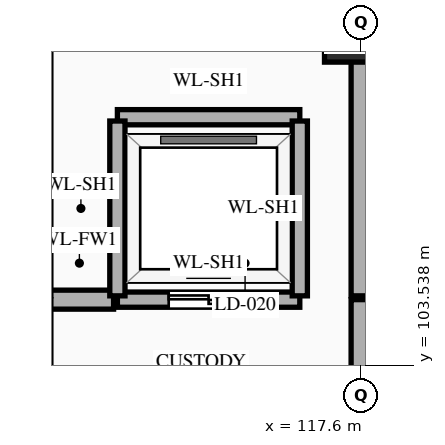
"""IFC4 building model, lengths in metres.
Left out: names, types, materials, properties, quantities, classifications, styles, units other than length and angle.
Written with IfcOpenShell. Run it as: python <this file> out.ifc"""

import sys

from ifc_helpers import new_model, si_unit, direction, frame, frame_2d, origin, origin_2d, place, context, subcontext, project, spatial, rectangle, extrude, element, fill, save


model = new_model("IFC4")
c1 = context("Model", 3, precision=1e-05, world=origin(), true_north=direction((0.0, 1.0)))
c2 = subcontext(c1, "Body", "Model", "MODEL_VIEW")
j1 = project(units=[si_unit("LENGTHUNIT", "METRE"), si_unit("PLANEANGLEUNIT", "RADIAN")], contexts=[c1])
p1 = place(None, origin())
s1 = spatial("IfcSite", under=j1, at=p1, CompositionType="ELEMENT")
p2 = place(p1, origin())
s2 = spatial("IfcBuilding", under=s1, at=p2, CompositionType="ELEMENT")
p3 = place(p2, frame((0.0, 0.0, -5.4)))
s3 = spatial("IfcBuildingStorey", under=s2, at=p3, CompositionType="ELEMENT", Elevation=-5.4)
p4 = place(p3, frame((117.6, 108.0, 0.0), z_axis=(0.0, 0.0, 1.0), x_axis=(1.0, 0.0, 0.0)))
e1 = element("IfcColumn", 1, at=p4, inside=s3, PredefinedType="COLUMN", context=c2, shape_type="SweptSolid", body=[
    extrude(rectangle(XDim=0.95, YDim=0.95, at=origin_2d()), origin(), (0.0, 0.0, 1.0), 5.4),
])
p5 = place(p3, frame((113.45, 104.4, 0.0), z_axis=(0.0, 0.0, 1.0), x_axis=(1.0, 0.0, 0.0)))
e2 = element("IfcWall", 2, at=p5, inside=s3, PredefinedType="STANDARD", context=c2, shape_type="SweptSolid", body=[
    extrude(rectangle(XDim=0.9, YDim=0.25, at=frame_2d((0.45, 0.0))), origin(), (0.0, 0.0, 1.0), 5.1),
])
p6 = place(p3, frame((114.4, 104.4, 0.0), z_axis=(0.0, 0.0, 1.0), x_axis=(1.0, 0.0, 0.0)))
e3 = element("IfcWall", 3, at=p6, inside=s3, PredefinedType="STANDARD", context=c2, shape_type="SweptSolid", body=[
    extrude(rectangle(XDim=2.4, YDim=0.2, at=frame_2d((1.2, 0.0))), origin(), (0.0, 0.0, 1.0), 5.1),
])
p7 = place(p6, frame((0.675, 0.0, 0.0)))
e4 = element("IfcOpeningElement", 4, at=p7, cuts=e3, PredefinedType="OPENING", context=c2, shape_type="SweptSolid", body=[
    extrude(rectangle(XDim=1.05, YDim=2.15, at=frame_2d((0.525, 1.075))), frame((0.0, 0.112, 0.0), z_axis=(0.0, -1.0, 0.0), x_axis=(1.0, 0.0, 0.0)), (0.0, 0.0, 1.0), 0.224),
])
p8 = place(p3, frame((114.4, 106.8, 0.0), z_axis=(0.0, 0.0, 1.0), x_axis=(1.0, 0.0, 0.0)))
e5 = element("IfcWall", 5, at=p8, inside=s3, PredefinedType="STANDARD", context=c2, shape_type="SweptSolid", body=[
    extrude(rectangle(XDim=2.4, YDim=0.2, at=frame_2d((1.2, 0.0))), origin(), (0.0, 0.0, 1.0), 5.1),
])
for number, where, z_axis, x_axis in (
    (6, (114.4, 104.45, 0.0), (0.0, 0.0, 1.0), (0.0, 1.0, 0.0)),
    (7, (116.8, 104.45, 0.0), (0.0, 0.0, 1.0), (0.0, 1.0, 0.0)),
):
    element("IfcWall", number, at=place(p3, frame(where, z_axis=z_axis, x_axis=x_axis)), inside=s3, PredefinedType="STANDARD", context=c2, shape_type="SweptSolid", body=[
        extrude(rectangle(XDim=2.3, YDim=0.2, at=frame_2d((1.15, 0.0))), origin(), (0.0, 0.0, 1.0), 5.1),
    ])
p9 = place(p3, frame((117.6, 91.2, 0.0), z_axis=(0.0, 0.0, 1.0), x_axis=(0.0, 1.0, 0.0)))
e8 = element("IfcWall", 8, at=p9, inside=s3, PredefinedType="STANDARD", context=c2, shape_type="SweptSolid", body=[
    extrude(rectangle(XDim=13.2, YDim=0.25, at=frame_2d((6.6, 0.0))), origin(), (0.0, 0.0, 1.0), 4.35),
])
p10 = place(p9, frame((0.502, 0.0, 0.0)))
e9 = element("IfcOpeningElement", 9, at=p10, cuts=e8, PredefinedType="OPENING", context=c2, shape_type="SweptSolid", body=[
    extrude(rectangle(XDim=1.0, YDim=2.2, at=frame_2d((0.5, 1.1))), frame((0.0, 0.137, 0.0), z_axis=(0.0, -1.0, 0.0), x_axis=(1.0, 0.0, 0.0)), (0.0, 0.0, 1.0), 0.274),
])
p11 = place(p9, frame((10.522, 0.0, 0.0)))
e10 = element("IfcOpeningElement", 10, at=p11, cuts=e8, PredefinedType="OPENING", context=c2, shape_type="SweptSolid", body=[
    extrude(rectangle(XDim=0.95, YDim=2.15, at=frame_2d((0.475, 1.075))), frame((0.0, 0.137, 0.0), z_axis=(0.0, -1.0, 0.0), x_axis=(1.0, 0.0, 0.0)), (0.0, 0.0, 1.0), 0.274),
])
p12 = place(p9, frame((3.248, 0.0, 0.0)))
e11 = element("IfcOpeningElement", 11, at=p12, cuts=e8, PredefinedType="OPENING", context=c2, shape_type="SweptSolid", body=[
    extrude(rectangle(XDim=1.1, YDim=2.2, at=frame_2d((0.55, 1.1))), frame((0.0, 0.137, 0.0), z_axis=(0.0, -1.0, 0.0), x_axis=(1.0, 0.0, 0.0)), (0.0, 0.0, 1.0), 0.274),
])
p13 = place(p3, frame((117.6, 104.45, 0.0), z_axis=(0.0, 0.0, 1.0), x_axis=(0.0, 1.0, 0.0)))
e12 = element("IfcWall", 12, at=p13, inside=s3, PredefinedType="STANDARD", context=c2, shape_type="SweptSolid", body=[
    extrude(rectangle(XDim=3.5, YDim=0.25, at=frame_2d((1.75, 0.0))), origin(), (0.0, 0.0, 1.0), 4.35),
])
p14 = place(p7, origin())
e13 = element("IfcDoor", 13, at=p14, inside=s3, OperationType="DOUBLE_DOOR_SLIDING", PredefinedType="DOOR", context=c2, shape_type="SweptSolid", body=[
    extrude(rectangle(XDim=1.05, YDim=2.15, at=frame_2d((0.525, 1.075))), frame((0.0, 0.025, 0.0), z_axis=(0.0, -1.0, 0.0), x_axis=(1.0, 0.0, 0.0)), (0.0, 0.0, 1.0), 0.05),
])
fill(e4, e13)
save(model, sys.argv[1])
